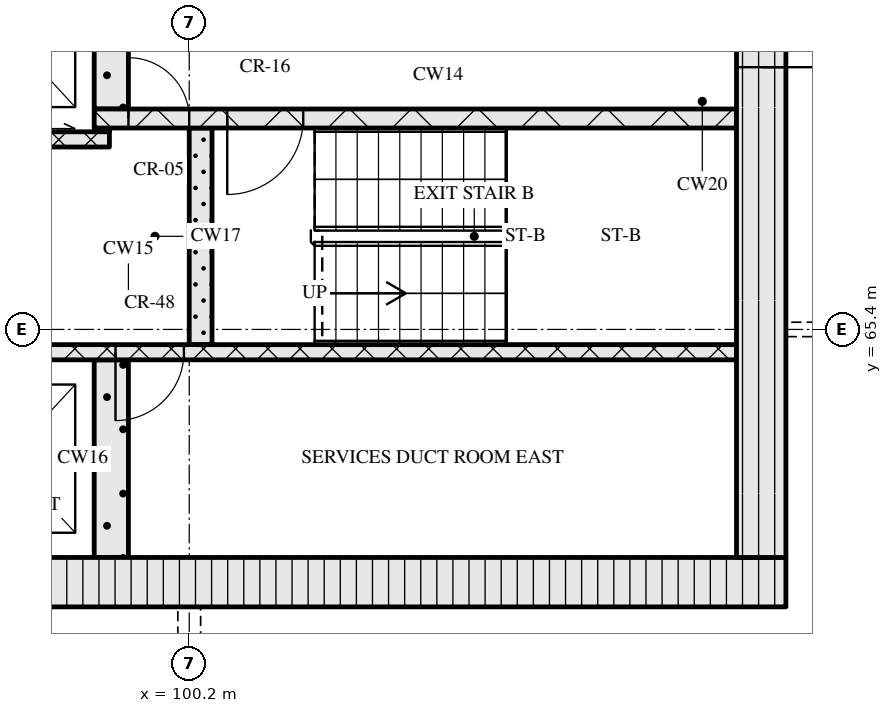
"""IFC4 building model, lengths in metres.
Left out: names, types, materials, properties, quantities, classifications, styles, units other than length and angle.
Written with IfcOpenShell. Run it as: python <this file> out.ifc"""

import sys

from ifc_helpers import new_model, si_unit, direction, frame, frame_2d, origin, place, context, subcontext, project, spatial, rectangle, extrude, element, fill, save


model = new_model("IFC4")
c1 = context("Model", 3, precision=1e-05, world=origin(), true_north=direction((0.0, 1.0)))
c2 = subcontext(c1, "Body", "Model", "MODEL_VIEW")
j1 = project(units=[si_unit("LENGTHUNIT", "METRE"), si_unit("PLANEANGLEUNIT", "RADIAN")], contexts=[c1])
p1 = place(None, origin())
s1 = spatial("IfcSite", under=j1, at=p1, CompositionType="ELEMENT")
p2 = place(p1, origin())
s2 = spatial("IfcBuilding", under=s1, at=p2, CompositionType="ELEMENT")
p3 = place(p2, frame((0.0, 0.0, 241.5)))
s3 = spatial("IfcBuildingStorey", under=s2, at=p3, CompositionType="ELEMENT", Elevation=241.5)
p4 = place(p3, frame((67.15, 62.075, 0.0), z_axis=(0.0, 0.0, 1.0), x_axis=(1.0, 0.0, 0.0)))
e1 = element("IfcWall", 1, at=p4, inside=s3, PredefinedType="SOLIDWALL", context=c2, shape_type="SweptSolid", body=[
    extrude(rectangle(XDim=40.9, YDim=0.65, at=frame_2d((20.45, 0.0))), origin(), (0.0, 0.0, 1.0), 3.32),
])
p5 = place(p4, frame((20.8, 0.0, 0.0)))
e2 = element("IfcOpeningElement", 2, at=p5, cuts=e1, PredefinedType="OPENING", context=c2, shape_type="SweptSolid", body=[
    extrude(rectangle(XDim=1.8, YDim=2.1, at=frame_2d((0.9, 1.05))), frame((0.0, 0.335, 0.0), z_axis=(0.0, -1.0, 0.0), x_axis=(1.0, 0.0, 0.0)), (0.0, 0.0, 1.0), 0.67),
])
p6 = place(p3, frame((107.725, 62.4, 0.0), z_axis=(0.0, 0.0, 1.0), x_axis=(0.0, 1.0, 0.0)))
e3 = element("IfcWall", 3, at=p6, inside=s3, PredefinedType="SOLIDWALL", context=c2, shape_type="SweptSolid", body=[
    extrude(rectangle(XDim=12.0, YDim=0.65, at=frame_2d((6.0, 0.0))), origin(), (0.0, 0.0, 1.0), 3.32),
])
p7 = place(p6, frame((6.45, 0.0, 0.0)))
e4 = element("IfcOpeningElement", 4, at=p7, cuts=e3, PredefinedType="OPENING", context=c2, shape_type="SweptSolid", body=[
    extrude(rectangle(XDim=1.2, YDim=2.1, at=frame_2d((0.6, 1.05))), frame((0.0, 0.335, 0.0), z_axis=(0.0, -1.0, 0.0), x_axis=(1.0, 0.0, 0.0)), (0.0, 0.0, 1.0), 0.67),
])
p8 = place(p3, frame((99.175, 62.4, 0.0), z_axis=(0.0, 0.0, 1.0), x_axis=(0.0, 1.0, 0.0)))
e5 = element("IfcWall", 5, at=p8, inside=s3, PredefinedType="SOLIDWALL", context=c2, shape_type="SweptSolid", body=[
    extrude(rectangle(XDim=2.6, YDim=0.45, at=frame_2d((1.3, 0.0))), origin(), (0.0, 0.0, 1.0), 3.32),
])
p9 = place(p3, frame((91.4, 65.1, 0.0), z_axis=(0.0, 0.0, 1.0), x_axis=(1.0, 0.0, 0.0)))
e6 = element("IfcWall", 6, at=p9, inside=s3, PredefinedType="SOLIDWALL", context=c2, shape_type="SweptSolid", body=[
    extrude(rectangle(XDim=16.0, YDim=0.2, at=frame_2d((8.0, 0.0))), origin(), (0.0, 0.0, 1.0), 3.32),
])
p10 = place(p9, frame((0.85, 0.0, 0.0)))
e7 = element("IfcOpeningElement", 7, at=p10, cuts=e6, PredefinedType="OPENING", context=c2, shape_type="SweptSolid", body=[
    extrude(rectangle(XDim=1.1, YDim=2.1, at=frame_2d((0.55, 1.05))), frame((0.0, 0.11, 0.0), z_axis=(0.0, -1.0, 0.0), x_axis=(1.0, 0.0, 0.0)), (0.0, 0.0, 1.0), 0.22),
])
p11 = place(p9, frame((3.35, 0.0, 0.0)))
e8 = element("IfcOpeningElement", 8, at=p11, cuts=e6, PredefinedType="OPENING", context=c2, shape_type="SweptSolid", body=[
    extrude(rectangle(XDim=1.1, YDim=2.1, at=frame_2d((0.55, 1.05))), frame((0.0, 0.11, 0.0), z_axis=(0.0, -1.0, 0.0), x_axis=(1.0, 0.0, 0.0)), (0.0, 0.0, 1.0), 0.22),
])
p12 = place(p9, frame((5.85, 0.0, 0.0)))
e9 = element("IfcOpeningElement", 9, at=p12, cuts=e6, PredefinedType="OPENING", context=c2, shape_type="SweptSolid", body=[
    extrude(rectangle(XDim=1.1, YDim=2.1, at=frame_2d((0.55, 1.05))), frame((0.0, 0.11, 0.0), z_axis=(0.0, -1.0, 0.0), x_axis=(1.0, 0.0, 0.0)), (0.0, 0.0, 1.0), 0.22),
])
p13 = place(p9, frame((7.83, 0.0, 0.0)))
e10 = element("IfcOpeningElement", 10, at=p13, cuts=e6, PredefinedType="OPENING", context=c2, shape_type="SweptSolid", body=[
    extrude(rectangle(XDim=0.9, YDim=2.1, at=frame_2d((0.45, 1.05))), frame((0.0, 0.11, 0.0), z_axis=(0.0, -1.0, 0.0), x_axis=(1.0, 0.0, 0.0)), (0.0, 0.0, 1.0), 0.22),
])
p14 = place(p3, frame((100.35, 65.2, 0.0), z_axis=(0.0, 0.0, 1.0), x_axis=(0.0, 1.0, 0.0)))
e11 = element("IfcWall", 11, at=p14, inside=s3, PredefinedType="SOLIDWALL", context=c2, shape_type="SweptSolid", body=[
    extrude(rectangle(XDim=2.85, YDim=0.3, at=frame_2d((1.425, 0.0))), origin(), (0.0, 0.0, 1.0), 3.32),
])
p15 = place(p3, frame((76.05, 67.9, 0.0), z_axis=(0.0, 0.0, 1.0), x_axis=(1.0, 0.0, 0.0)))
e12 = element("IfcWall", 12, at=p15, inside=s3, PredefinedType="SOLIDWALL", context=c2, shape_type="SweptSolid", body=[
    extrude(rectangle(XDim=23.1, YDim=0.2, at=frame_2d((11.55, 0.0))), origin(), (0.0, 0.0, 1.0), 3.32),
])
p16 = place(p15, frame((0.75, 0.0, 0.0)))
e13 = element("IfcOpeningElement", 13, at=p16, cuts=e12, PredefinedType="OPENING", context=c2, shape_type="SweptSolid", body=[
    extrude(rectangle(XDim=0.9, YDim=2.1, at=frame_2d((0.45, 1.05))), frame((0.0, 0.11, 0.0), z_axis=(0.0, -1.0, 0.0), x_axis=(1.0, 0.0, 0.0)), (0.0, 0.0, 1.0), 0.22),
])
p17 = place(p15, frame((3.32, 0.0, 0.0)))
e14 = element("IfcOpeningElement", 14, at=p17, cuts=e12, PredefinedType="OPENING", context=c2, shape_type="SweptSolid", body=[
    extrude(rectangle(XDim=0.9, YDim=2.1, at=frame_2d((0.45, 1.05))), frame((0.0, 0.11, 0.0), z_axis=(0.0, -1.0, 0.0), x_axis=(1.0, 0.0, 0.0)), (0.0, 0.0, 1.0), 0.22),
])
p18 = place(p15, frame((5.77, 0.0, 0.0)))
e15 = element("IfcOpeningElement", 15, at=p18, cuts=e12, PredefinedType="OPENING", context=c2, shape_type="SweptSolid", body=[
    extrude(rectangle(XDim=0.9, YDim=2.1, at=frame_2d((0.45, 1.05))), frame((0.0, 0.11, 0.0), z_axis=(0.0, -1.0, 0.0), x_axis=(1.0, 0.0, 0.0)), (0.0, 0.0, 1.0), 0.22),
])
p19 = place(p15, frame((8.45, 0.0, 0.0)))
e16 = element("IfcOpeningElement", 16, at=p19, cuts=e12, PredefinedType="OPENING", context=c2, shape_type="SweptSolid", body=[
    extrude(rectangle(XDim=0.9, YDim=2.1, at=frame_2d((0.45, 1.05))), frame((0.0, 0.11, 0.0), z_axis=(0.0, -1.0, 0.0), x_axis=(1.0, 0.0, 0.0)), (0.0, 0.0, 1.0), 0.22),
])
p20 = place(p15, frame((10.91, 0.0, 0.0)))
e17 = element("IfcOpeningElement", 17, at=p20, cuts=e12, PredefinedType="OPENING", context=c2, shape_type="SweptSolid", body=[
    extrude(rectangle(XDim=0.9, YDim=2.1, at=frame_2d((0.45, 1.05))), frame((0.0, 0.11, 0.0), z_axis=(0.0, -1.0, 0.0), x_axis=(1.0, 0.0, 0.0)), (0.0, 0.0, 1.0), 0.22),
])
p21 = place(p15, frame((13.55, 0.0, 0.0)))
e18 = element("IfcOpeningElement", 18, at=p21, cuts=e12, PredefinedType="OPENING", context=c2, shape_type="SweptSolid", body=[
    extrude(rectangle(XDim=1.0, YDim=2.1, at=frame_2d((0.5, 1.05))), frame((0.0, 0.11, 0.0), z_axis=(0.0, -1.0, 0.0), x_axis=(1.0, 0.0, 0.0)), (0.0, 0.0, 1.0), 0.22),
])
p22 = place(p15, frame((16.2, 0.0, 0.0)))
e19 = element("IfcOpeningElement", 19, at=p22, cuts=e12, PredefinedType="OPENING", context=c2, shape_type="SweptSolid", body=[
    extrude(rectangle(XDim=1.1, YDim=2.1, at=frame_2d((0.55, 1.05))), frame((0.0, 0.11, 0.0), z_axis=(0.0, -1.0, 0.0), x_axis=(1.0, 0.0, 0.0)), (0.0, 0.0, 1.0), 0.22),
])
p23 = place(p15, frame((18.7, 0.0, 0.0)))
e20 = element("IfcOpeningElement", 20, at=p23, cuts=e12, PredefinedType="OPENING", context=c2, shape_type="SweptSolid", body=[
    extrude(rectangle(XDim=1.1, YDim=2.1, at=frame_2d((0.55, 1.05))), frame((0.0, 0.11, 0.0), z_axis=(0.0, -1.0, 0.0), x_axis=(1.0, 0.0, 0.0)), (0.0, 0.0, 1.0), 0.22),
])
p24 = place(p15, frame((21.2, 0.0, 0.0)))
e21 = element("IfcOpeningElement", 21, at=p24, cuts=e12, PredefinedType="OPENING", context=c2, shape_type="SweptSolid", body=[
    extrude(rectangle(XDim=1.1, YDim=2.1, at=frame_2d((0.55, 1.05))), frame((0.0, 0.11, 0.0), z_axis=(0.0, -1.0, 0.0), x_axis=(1.0, 0.0, 0.0)), (0.0, 0.0, 1.0), 0.22),
])
p25 = place(p3, frame((98.95, 68.025, 0.0), z_axis=(0.0, 0.0, 1.0), x_axis=(1.0, 0.0, 0.0)))
e22 = element("IfcWall", 22, at=p25, inside=s3, PredefinedType="SOLIDWALL", context=c2, shape_type="SweptSolid", body=[
    extrude(rectangle(XDim=0.2, YDim=0.05, at=frame_2d((0.1, 0.0))), origin(), (0.0, 0.0, 1.0), 3.32),
])
p26 = place(p3, frame((98.95, 68.175, 0.0), z_axis=(0.0, 0.0, 1.0), x_axis=(1.0, 0.0, 0.0)))
e23 = element("IfcWall", 23, at=p26, inside=s3, PredefinedType="SOLIDWALL", context=c2, shape_type="SweptSolid", body=[
    extrude(rectangle(XDim=8.45, YDim=0.25, at=frame_2d((4.225, 0.0))), origin(), (0.0, 0.0, 1.0), 3.32),
])
p27 = place(p26, frame((0.45, 0.0, 0.0)))
e24 = element("IfcOpeningElement", 24, at=p27, cuts=e23, PredefinedType="OPENING", context=c2, shape_type="SweptSolid", body=[
    extrude(rectangle(XDim=0.8, YDim=2.1, at=frame_2d((0.4, 1.05))), frame((0.0, 0.135, 0.0), z_axis=(0.0, -1.0, 0.0), x_axis=(1.0, 0.0, 0.0)), (0.0, 0.0, 1.0), 0.27),
])
p28 = place(p26, frame((1.75, 0.0, 0.0)))
e25 = element("IfcOpeningElement", 25, at=p28, cuts=e23, PredefinedType="OPENING", context=c2, shape_type="SweptSolid", body=[
    extrude(rectangle(XDim=1.0, YDim=2.1, at=frame_2d((0.5, 1.05))), frame((0.0, 0.135, 0.0), z_axis=(0.0, -1.0, 0.0), x_axis=(1.0, 0.0, 0.0)), (0.0, 0.0, 1.0), 0.27),
])
p29 = place(p3, frame((99.175, 68.3, 0.0), z_axis=(0.0, 0.0, 1.0), x_axis=(0.0, 1.0, 0.0)))
e26 = element("IfcWall", 26, at=p29, inside=s3, PredefinedType="SOLIDWALL", context=c2, shape_type="SweptSolid", body=[
    extrude(rectangle(XDim=2.3, YDim=0.45, at=frame_2d((1.15, 0.0))), origin(), (0.0, 0.0, 1.0), 3.32),
])
p30 = place(p13, origin())
e27 = element("IfcDoor", 27, at=p30, inside=s3, OperationType="SINGLE_SWING_RIGHT", PredefinedType="DOOR", context=c2, shape_type="SweptSolid", body=[
    extrude(rectangle(XDim=0.9, YDim=2.1, at=frame_2d((0.45, 1.05))), frame((0.0, 0.025, 0.0), z_axis=(0.0, -1.0, 0.0), x_axis=(1.0, 0.0, 0.0)), (0.0, 0.0, 1.0), 0.05),
])
fill(e10, e27)
p31 = place(p27, origin())
e28 = element("IfcDoor", 28, at=p31, inside=s3, OperationType="SINGLE_SWING_LEFT", PredefinedType="DOOR", context=c2, shape_type="SweptSolid", body=[
    extrude(rectangle(XDim=0.8, YDim=2.1, at=frame_2d((0.4, 1.05))), frame((0.0, 0.025, 0.0), z_axis=(0.0, -1.0, 0.0), x_axis=(1.0, 0.0, 0.0)), (0.0, 0.0, 1.0), 0.05),
])
fill(e24, e28)
p32 = place(p28, origin())
e29 = element("IfcDoor", 29, at=p32, inside=s3, OperationType="SINGLE_SWING_RIGHT", PredefinedType="DOOR", context=c2, shape_type="SweptSolid", body=[
    extrude(rectangle(XDim=1.0, YDim=2.1, at=frame_2d((0.5, 1.05))), frame((0.0, 0.025, 0.0), z_axis=(0.0, -1.0, 0.0), x_axis=(1.0, 0.0, 0.0)), (0.0, 0.0, 1.0), 0.05),
])
fill(e25, e29)
p33 = place(p7, origin())
e30 = element("IfcDoor", 30, at=p33, inside=s3, OperationType="SINGLE_SWING_RIGHT", PredefinedType="DOOR", context=c2, shape_type="SweptSolid", body=[
    extrude(rectangle(XDim=1.2, YDim=2.1, at=frame_2d((0.6, 1.05))), frame((0.0, 0.025, 0.0), z_axis=(0.0, -1.0, 0.0), x_axis=(1.0, 0.0, 0.0)), (0.0, 0.0, 1.0), 0.05),
])
fill(e4, e30)
save(model, sys.argv[1])
